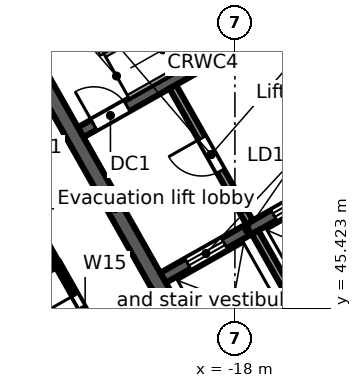
"""IFC4 building model, lengths in metres.
Left out: names, types, materials, properties, quantities, classifications, styles, units other than length and angle.
Written with IfcOpenShell. Run it as: python <this file> out.ifc"""

import sys

from ifc_helpers import new_model, si_unit, direction, frame, frame_2d, origin, place, context, subcontext, project, spatial, rectangle, extrude, element, fill, save


model = new_model("IFC4")
c1 = context("Model", 3, precision=1e-05, world=origin(), true_north=direction((0.0, 1.0)))
c2 = subcontext(c1, "Body", "Model", "MODEL_VIEW")
j1 = project(units=[si_unit("LENGTHUNIT", "METRE"), si_unit("PLANEANGLEUNIT", "RADIAN")], contexts=[c1])
p1 = place(None, origin())
s1 = spatial("IfcSite", under=j1, at=p1, CompositionType="ELEMENT")
p2 = place(p1, origin())
s2 = spatial("IfcBuilding", under=s1, at=p2, CompositionType="ELEMENT")
p3 = place(p2, frame((0.0, 0.0, 266.5)))
s3 = spatial("IfcBuildingStorey", under=s2, at=p3, CompositionType="ELEMENT", Elevation=266.5)
p4 = place(p3, frame((-58.732, 38.771, 0.0), z_axis=(0.0, 0.0, 1.0), x_axis=(0.870355615581, 0.492423702137, 0.0)))
e1 = element("IfcWall", 1, at=p4, inside=s3, PredefinedType="STANDARD", context=c2, shape_type="SweptSolid", body=[
    extrude(rectangle(XDim=64.052, YDim=0.25, at=frame_2d((32.026, 0.0))), origin(), (0.0, 0.0, 1.0), 3.52),
])
p5 = place(p4, frame((61.259, 0.0, 0.8)))
e2 = element("IfcOpeningElement", 2, at=p5, cuts=e1, PredefinedType="OPENING", context=c2, shape_type="SweptSolid", body=[
    extrude(rectangle(XDim=2.4, YDim=2.2, at=frame_2d((1.2, 1.1))), frame((0.0, 0.135, 0.0), z_axis=(0.0, -1.0, 0.0), x_axis=(1.0, 0.0, 0.0)), (0.0, 0.0, 1.0), 0.27),
])
p6 = place(p4, frame((58.216, 0.0, 0.8)))
e3 = element("IfcOpeningElement", 3, at=p6, cuts=e1, PredefinedType="OPENING", context=c2, shape_type="SweptSolid", body=[
    extrude(rectangle(XDim=2.4, YDim=2.2, at=frame_2d((1.2, 1.1))), frame((0.0, 0.135, 0.0), z_axis=(0.0, -1.0, 0.0), x_axis=(1.0, 0.0, 0.0)), (0.0, 0.0, 1.0), 0.27),
])
p7 = place(p4, frame((55.173, 0.0, 0.8)))
e4 = element("IfcOpeningElement", 4, at=p7, cuts=e1, PredefinedType="OPENING", context=c2, shape_type="SweptSolid", body=[
    extrude(rectangle(XDim=2.4, YDim=2.2, at=frame_2d((1.2, 1.1))), frame((0.0, 0.135, 0.0), z_axis=(0.0, -1.0, 0.0), x_axis=(1.0, 0.0, 0.0)), (0.0, 0.0, 1.0), 0.27),
])
p8 = place(p4, frame((52.129, 0.0, 0.8)))
e5 = element("IfcOpeningElement", 5, at=p8, cuts=e1, PredefinedType="OPENING", context=c2, shape_type="SweptSolid", body=[
    extrude(rectangle(XDim=2.4, YDim=2.2, at=frame_2d((1.2, 1.1))), frame((0.0, 0.135, 0.0), z_axis=(0.0, -1.0, 0.0), x_axis=(1.0, 0.0, 0.0)), (0.0, 0.0, 1.0), 0.27),
])
p9 = place(p4, frame((49.086, 0.0, 0.8)))
e6 = element("IfcOpeningElement", 6, at=p9, cuts=e1, PredefinedType="OPENING", context=c2, shape_type="SweptSolid", body=[
    extrude(rectangle(XDim=2.4, YDim=2.2, at=frame_2d((1.2, 1.1))), frame((0.0, 0.135, 0.0), z_axis=(0.0, -1.0, 0.0), x_axis=(1.0, 0.0, 0.0)), (0.0, 0.0, 1.0), 0.27),
])
p10 = place(p4, frame((46.043, 0.0, 0.8)))
e7 = element("IfcOpeningElement", 7, at=p10, cuts=e1, PredefinedType="OPENING", context=c2, shape_type="SweptSolid", body=[
    extrude(rectangle(XDim=2.4, YDim=2.2, at=frame_2d((1.2, 1.1))), frame((0.0, 0.135, 0.0), z_axis=(0.0, -1.0, 0.0), x_axis=(1.0, 0.0, 0.0)), (0.0, 0.0, 1.0), 0.27),
])
p11 = place(p4, frame((43.0, 0.0, 0.8)))
e8 = element("IfcOpeningElement", 8, at=p11, cuts=e1, PredefinedType="OPENING", context=c2, shape_type="SweptSolid", body=[
    extrude(rectangle(XDim=2.4, YDim=2.2, at=frame_2d((1.2, 1.1))), frame((0.0, 0.135, 0.0), z_axis=(0.0, -1.0, 0.0), x_axis=(1.0, 0.0, 0.0)), (0.0, 0.0, 1.0), 0.27),
])
p12 = place(p4, frame((39.956, 0.0, 0.8)))
e9 = element("IfcOpeningElement", 9, at=p12, cuts=e1, PredefinedType="OPENING", context=c2, shape_type="SweptSolid", body=[
    extrude(rectangle(XDim=2.4, YDim=2.2, at=frame_2d((1.2, 1.1))), frame((0.0, 0.135, 0.0), z_axis=(0.0, -1.0, 0.0), x_axis=(1.0, 0.0, 0.0)), (0.0, 0.0, 1.0), 0.27),
])
p13 = place(p4, frame((36.913, 0.0, 0.8)))
e10 = element("IfcOpeningElement", 10, at=p13, cuts=e1, PredefinedType="OPENING", context=c2, shape_type="SweptSolid", body=[
    extrude(rectangle(XDim=2.4, YDim=2.2, at=frame_2d((1.2, 1.1))), frame((0.0, 0.135, 0.0), z_axis=(0.0, -1.0, 0.0), x_axis=(1.0, 0.0, 0.0)), (0.0, 0.0, 1.0), 0.27),
])
p14 = place(p4, frame((33.87, 0.0, 0.8)))
e11 = element("IfcOpeningElement", 11, at=p14, cuts=e1, PredefinedType="OPENING", context=c2, shape_type="SweptSolid", body=[
    extrude(rectangle(XDim=2.4, YDim=2.2, at=frame_2d((1.2, 1.1))), frame((0.0, 0.135, 0.0), z_axis=(0.0, -1.0, 0.0), x_axis=(1.0, 0.0, 0.0)), (0.0, 0.0, 1.0), 0.27),
])
p15 = place(p4, frame((30.826, 0.0, 0.8)))
e12 = element("IfcOpeningElement", 12, at=p15, cuts=e1, PredefinedType="OPENING", context=c2, shape_type="SweptSolid", body=[
    extrude(rectangle(XDim=2.4, YDim=2.2, at=frame_2d((1.2, 1.1))), frame((0.0, 0.135, 0.0), z_axis=(0.0, -1.0, 0.0), x_axis=(1.0, 0.0, 0.0)), (0.0, 0.0, 1.0), 0.27),
])
p16 = place(p4, frame((27.783, 0.0, 0.8)))
e13 = element("IfcOpeningElement", 13, at=p16, cuts=e1, PredefinedType="OPENING", context=c2, shape_type="SweptSolid", body=[
    extrude(rectangle(XDim=2.4, YDim=2.2, at=frame_2d((1.2, 1.1))), frame((0.0, 0.135, 0.0), z_axis=(0.0, -1.0, 0.0), x_axis=(1.0, 0.0, 0.0)), (0.0, 0.0, 1.0), 0.27),
])
p17 = place(p4, frame((24.74, 0.0, 0.8)))
e14 = element("IfcOpeningElement", 14, at=p17, cuts=e1, PredefinedType="OPENING", context=c2, shape_type="SweptSolid", body=[
    extrude(rectangle(XDim=2.4, YDim=2.2, at=frame_2d((1.2, 1.1))), frame((0.0, 0.135, 0.0), z_axis=(0.0, -1.0, 0.0), x_axis=(1.0, 0.0, 0.0)), (0.0, 0.0, 1.0), 0.27),
])
p18 = place(p4, frame((21.696, 0.0, 0.8)))
e15 = element("IfcOpeningElement", 15, at=p18, cuts=e1, PredefinedType="OPENING", context=c2, shape_type="SweptSolid", body=[
    extrude(rectangle(XDim=2.4, YDim=2.2, at=frame_2d((1.2, 1.1))), frame((0.0, 0.135, 0.0), z_axis=(0.0, -1.0, 0.0), x_axis=(1.0, 0.0, 0.0)), (0.0, 0.0, 1.0), 0.27),
])
p19 = place(p4, frame((18.653, 0.0, 0.8)))
e16 = element("IfcOpeningElement", 16, at=p19, cuts=e1, PredefinedType="OPENING", context=c2, shape_type="SweptSolid", body=[
    extrude(rectangle(XDim=2.4, YDim=2.2, at=frame_2d((1.2, 1.1))), frame((0.0, 0.135, 0.0), z_axis=(0.0, -1.0, 0.0), x_axis=(1.0, 0.0, 0.0)), (0.0, 0.0, 1.0), 0.27),
])
p20 = place(p4, frame((15.61, 0.0, 0.8)))
e17 = element("IfcOpeningElement", 17, at=p20, cuts=e1, PredefinedType="OPENING", context=c2, shape_type="SweptSolid", body=[
    extrude(rectangle(XDim=2.4, YDim=2.2, at=frame_2d((1.2, 1.1))), frame((0.0, 0.135, 0.0), z_axis=(0.0, -1.0, 0.0), x_axis=(1.0, 0.0, 0.0)), (0.0, 0.0, 1.0), 0.27),
])
p21 = place(p4, frame((12.567, 0.0, 0.8)))
e18 = element("IfcOpeningElement", 18, at=p21, cuts=e1, PredefinedType="OPENING", context=c2, shape_type="SweptSolid", body=[
    extrude(rectangle(XDim=2.4, YDim=2.2, at=frame_2d((1.2, 1.1))), frame((0.0, 0.135, 0.0), z_axis=(0.0, -1.0, 0.0), x_axis=(1.0, 0.0, 0.0)), (0.0, 0.0, 1.0), 0.27),
])
p22 = place(p4, frame((9.523, 0.0, 0.8)))
e19 = element("IfcOpeningElement", 19, at=p22, cuts=e1, PredefinedType="OPENING", context=c2, shape_type="SweptSolid", body=[
    extrude(rectangle(XDim=2.4, YDim=2.2, at=frame_2d((1.2, 1.1))), frame((0.0, 0.135, 0.0), z_axis=(0.0, -1.0, 0.0), x_axis=(1.0, 0.0, 0.0)), (0.0, 0.0, 1.0), 0.27),
])
p23 = place(p4, frame((6.48, 0.0, 0.8)))
e20 = element("IfcOpeningElement", 20, at=p23, cuts=e1, PredefinedType="OPENING", context=c2, shape_type="SweptSolid", body=[
    extrude(rectangle(XDim=2.4, YDim=2.2, at=frame_2d((1.2, 1.1))), frame((0.0, 0.135, 0.0), z_axis=(0.0, -1.0, 0.0), x_axis=(1.0, 0.0, 0.0)), (0.0, 0.0, 1.0), 0.27),
])
p24 = place(p4, frame((3.437, 0.0, 0.8)))
e21 = element("IfcOpeningElement", 21, at=p24, cuts=e1, PredefinedType="OPENING", context=c2, shape_type="SweptSolid", body=[
    extrude(rectangle(XDim=2.4, YDim=2.2, at=frame_2d((1.2, 1.1))), frame((0.0, 0.135, 0.0), z_axis=(0.0, -1.0, 0.0), x_axis=(1.0, 0.0, 0.0)), (0.0, 0.0, 1.0), 0.27),
])
p25 = place(p4, frame((0.393, 0.0, 0.8)))
e22 = element("IfcOpeningElement", 22, at=p25, cuts=e1, PredefinedType="OPENING", context=c2, shape_type="SweptSolid", body=[
    extrude(rectangle(XDim=2.4, YDim=2.2, at=frame_2d((1.2, 1.1))), frame((0.0, 0.135, 0.0), z_axis=(0.0, -1.0, 0.0), x_axis=(1.0, 0.0, 0.0)), (0.0, 0.0, 1.0), 0.27),
])
p26 = place(p3, frame((-3.017, 46.293, 0.0), z_axis=(0.0, 0.0, 1.0), x_axis=(-0.870355474887, -0.492423950812, 0.0)))
e23 = element("IfcWall", 23, at=p26, inside=s3, PredefinedType="STANDARD", context=c2, shape_type="SweptSolid", body=[
    extrude(rectangle(XDim=40.34, YDim=0.25, at=frame_2d((20.17, 0.0))), origin(), (0.0, 0.0, 1.0), 3.52),
])
p27 = place(p26, frame((37.428, 0.0, 0.8)))
e24 = element("IfcOpeningElement", 24, at=p27, cuts=e23, PredefinedType="OPENING", context=c2, shape_type="SweptSolid", body=[
    extrude(rectangle(XDim=2.4, YDim=2.2, at=frame_2d((1.2, 1.1))), frame((0.0, 0.135, 0.0), z_axis=(0.0, -1.0, 0.0), x_axis=(1.0, 0.0, 0.0)), (0.0, 0.0, 1.0), 0.27),
])
p28 = place(p26, frame((34.372, 0.0, 0.0)))
e25 = element("IfcOpeningElement", 25, at=p28, cuts=e23, PredefinedType="OPENING", context=c2, shape_type="SweptSolid", body=[
    extrude(rectangle(XDim=1.8, YDim=2.4, at=frame_2d((0.9, 1.2))), frame((0.0, 0.135, 0.0), z_axis=(0.0, -1.0, 0.0), x_axis=(1.0, 0.0, 0.0)), (0.0, 0.0, 1.0), 0.27),
])
p29 = place(p26, frame((30.716, 0.0, 0.8)))
e26 = element("IfcOpeningElement", 26, at=p29, cuts=e23, PredefinedType="OPENING", context=c2, shape_type="SweptSolid", body=[
    extrude(rectangle(XDim=2.4, YDim=2.2, at=frame_2d((1.2, 1.1))), frame((0.0, 0.135, 0.0), z_axis=(0.0, -1.0, 0.0), x_axis=(1.0, 0.0, 0.0)), (0.0, 0.0, 1.0), 0.27),
])
p30 = place(p26, frame((27.36, 0.0, 0.8)))
e27 = element("IfcOpeningElement", 27, at=p30, cuts=e23, PredefinedType="OPENING", context=c2, shape_type="SweptSolid", body=[
    extrude(rectangle(XDim=2.4, YDim=2.2, at=frame_2d((1.2, 1.1))), frame((0.0, 0.135, 0.0), z_axis=(0.0, -1.0, 0.0), x_axis=(1.0, 0.0, 0.0)), (0.0, 0.0, 1.0), 0.27),
])
p31 = place(p26, frame((24.304, 0.0, 0.0)))
e28 = element("IfcOpeningElement", 28, at=p31, cuts=e23, PredefinedType="OPENING", context=c2, shape_type="SweptSolid", body=[
    extrude(rectangle(XDim=1.8, YDim=2.4, at=frame_2d((0.9, 1.2))), frame((0.0, 0.135, 0.0), z_axis=(0.0, -1.0, 0.0), x_axis=(1.0, 0.0, 0.0)), (0.0, 0.0, 1.0), 0.27),
])
p32 = place(p26, frame((20.648, 0.0, 0.8)))
e29 = element("IfcOpeningElement", 29, at=p32, cuts=e23, PredefinedType="OPENING", context=c2, shape_type="SweptSolid", body=[
    extrude(rectangle(XDim=2.4, YDim=2.2, at=frame_2d((1.2, 1.1))), frame((0.0, 0.135, 0.0), z_axis=(0.0, -1.0, 0.0), x_axis=(1.0, 0.0, 0.0)), (0.0, 0.0, 1.0), 0.27),
])
p33 = place(p26, frame((17.292, 0.0, 0.8)))
e30 = element("IfcOpeningElement", 30, at=p33, cuts=e23, PredefinedType="OPENING", context=c2, shape_type="SweptSolid", body=[
    extrude(rectangle(XDim=2.4, YDim=2.2, at=frame_2d((1.2, 1.1))), frame((0.0, 0.135, 0.0), z_axis=(0.0, -1.0, 0.0), x_axis=(1.0, 0.0, 0.0)), (0.0, 0.0, 1.0), 0.27),
])
p34 = place(p26, frame((14.236, 0.0, 0.0)))
e31 = element("IfcOpeningElement", 31, at=p34, cuts=e23, PredefinedType="OPENING", context=c2, shape_type="SweptSolid", body=[
    extrude(rectangle(XDim=1.8, YDim=2.4, at=frame_2d((0.9, 1.2))), frame((0.0, 0.135, 0.0), z_axis=(0.0, -1.0, 0.0), x_axis=(1.0, 0.0, 0.0)), (0.0, 0.0, 1.0), 0.27),
])
p35 = place(p26, frame((10.58, 0.0, 0.8)))
e32 = element("IfcOpeningElement", 32, at=p35, cuts=e23, PredefinedType="OPENING", context=c2, shape_type="SweptSolid", body=[
    extrude(rectangle(XDim=2.4, YDim=2.2, at=frame_2d((1.2, 1.1))), frame((0.0, 0.135, 0.0), z_axis=(0.0, -1.0, 0.0), x_axis=(1.0, 0.0, 0.0)), (0.0, 0.0, 1.0), 0.27),
])
p36 = place(p26, frame((7.224, 0.0, 0.8)))
e33 = element("IfcOpeningElement", 33, at=p36, cuts=e23, PredefinedType="OPENING", context=c2, shape_type="SweptSolid", body=[
    extrude(rectangle(XDim=2.4, YDim=2.2, at=frame_2d((1.2, 1.1))), frame((0.0, 0.135, 0.0), z_axis=(0.0, -1.0, 0.0), x_axis=(1.0, 0.0, 0.0)), (0.0, 0.0, 1.0), 0.27),
])
p37 = place(p26, frame((4.168, 0.0, 0.0)))
e34 = element("IfcOpeningElement", 34, at=p37, cuts=e23, PredefinedType="OPENING", context=c2, shape_type="SweptSolid", body=[
    extrude(rectangle(XDim=1.8, YDim=2.4, at=frame_2d((0.9, 1.2))), frame((0.0, 0.135, 0.0), z_axis=(0.0, -1.0, 0.0), x_axis=(1.0, 0.0, 0.0)), (0.0, 0.0, 1.0), 0.27),
])
p38 = place(p26, frame((0.512, 0.0, 0.8)))
e35 = element("IfcOpeningElement", 35, at=p38, cuts=e23, PredefinedType="OPENING", context=c2, shape_type="SweptSolid", body=[
    extrude(rectangle(XDim=2.4, YDim=2.2, at=frame_2d((1.2, 1.1))), frame((0.0, 0.135, 0.0), z_axis=(0.0, -1.0, 0.0), x_axis=(1.0, 0.0, 0.0)), (0.0, 0.0, 1.0), 0.27),
])
p39 = place(p3, frame((-17.975, 42.017, 0.0), z_axis=(0.0, 0.0, 1.0), x_axis=(0.87034965173, 0.492434243055, 0.0)))
e36 = element("IfcWall", 36, at=p39, inside=s3, PredefinedType="SOLIDWALL", context=c2, shape_type="SweptSolid", body=[
    extrude(rectangle(XDim=15.0, YDim=0.4, at=frame_2d((7.5, 0.0))), origin(), (0.0, 0.0, 1.0), 3.52),
])
p40 = place(p39, frame((6.1, 0.0, 0.0)))
e37 = element("IfcOpeningElement", 37, at=p40, cuts=e36, PredefinedType="OPENING", context=c2, shape_type="SweptSolid", body=[
    extrude(rectangle(XDim=1.2, YDim=2.1, at=frame_2d((0.6, 1.05))), frame((0.0, 0.21, 0.0), z_axis=(0.0, -1.0, 0.0), x_axis=(1.0, 0.0, 0.0)), (0.0, 0.0, 1.0), 0.42),
])
p41 = place(p3, frame((-19.892, 46.218, 0.0), z_axis=(0.0, 0.0, 1.0), x_axis=(0.870341639186, 0.492448404505, 0.0)))
e38 = element("IfcWall", 38, at=p41, inside=s3, PredefinedType="SOLIDWALL", context=c2, shape_type="SweptSolid", body=[
    extrude(rectangle(XDim=5.1, YDim=0.3, at=frame_2d((2.55, 0.0))), origin(), (0.0, 0.0, 1.0), 3.52),
])
p42 = place(p41, frame((0.75, 0.0, 0.0)))
e39 = element("IfcOpeningElement", 39, at=p42, cuts=e38, PredefinedType="OPENING", context=c2, shape_type="SweptSolid", body=[
    extrude(rectangle(XDim=1.1, YDim=2.1, at=frame_2d((0.55, 1.05))), frame((0.0, 0.16, 0.0), z_axis=(0.0, -1.0, 0.0), x_axis=(1.0, 0.0, 0.0)), (0.0, 0.0, 1.0), 0.32),
])
p43 = place(p41, frame((3.35, 0.0, 0.0)))
e40 = element("IfcOpeningElement", 40, at=p43, cuts=e38, PredefinedType="OPENING", context=c2, shape_type="SweptSolid", body=[
    extrude(rectangle(XDim=1.1, YDim=2.1, at=frame_2d((0.55, 1.05))), frame((0.0, 0.16, 0.0), z_axis=(0.0, -1.0, 0.0), x_axis=(1.0, 0.0, 0.0)), (0.0, 0.0, 1.0), 0.32),
])
p44 = place(p3, frame((-22.059, 50.047, 0.0), z_axis=(0.0, 0.0, 1.0), x_axis=(0.87035077051, 0.49243226567, 0.0)))
e41 = element("IfcWall", 41, at=p44, inside=s3, PredefinedType="SOLIDWALL", context=c2, shape_type="SweptSolid", body=[
    extrude(rectangle(XDim=7.4, YDim=0.3, at=frame_2d((3.7, 0.0))), origin(), (0.0, 0.0, 1.0), 3.52),
])
p45 = place(p44, frame((0.4, 0.0, 0.0)))
e42 = element("IfcOpeningElement", 42, at=p45, cuts=e41, PredefinedType="OPENING", context=c2, shape_type="SweptSolid", body=[
    extrude(rectangle(XDim=1.0, YDim=2.1, at=frame_2d((0.5, 1.05))), frame((0.0, 0.16, 0.0), z_axis=(0.0, -1.0, 0.0), x_axis=(1.0, 0.0, 0.0)), (0.0, 0.0, 1.0), 0.32),
])
p46 = place(p3, frame((-24.4, 53.779, 0.0), z_axis=(0.0, 0.0, 1.0), x_axis=(0.492421663121, -0.870356769198, 0.0)))
e43 = element("IfcWall", 43, at=p46, inside=s3, PredefinedType="SOLIDWALL", context=c2, shape_type="SweptSolid", body=[
    extrude(rectangle(XDim=13.2, YDim=0.4, at=frame_2d((6.6, 0.0))), origin(), (0.0, 0.0, 1.0), 3.52),
])
p47 = place(p3, frame((-17.469, 47.417, 0.0), z_axis=(0.0, 0.0, 1.0), x_axis=(0.492466057713, -0.870331650579, 0.0)))
e44 = element("IfcWall", 44, at=p47, inside=s3, PredefinedType="SOLIDWALL", context=c2, shape_type="SweptSolid", body=[
    extrude(rectangle(XDim=4.25, YDim=0.2, at=frame_2d((2.125, 0.0))), origin(), (0.0, 0.0, 1.0), 3.52),
])
p48 = place(p3, frame((-19.635, 51.246, 0.0), z_axis=(0.0, 0.0, 1.0), x_axis=(0.492408451753, -0.87036424366, 0.0)))
e45 = element("IfcWall", 45, at=p48, inside=s3, PredefinedType="PARTITIONING", context=c2, shape_type="SweptSolid", body=[
    extrude(rectangle(XDim=4.1, YDim=0.2, at=frame_2d((2.05, 0.0))), origin(), (0.0, 0.0, 1.0), 3.52),
])
p49 = place(p48, frame((1.55, 0.0, 0.0)))
e46 = element("IfcOpeningElement", 46, at=p49, cuts=e45, PredefinedType="OPENING", context=c2, shape_type="SweptSolid", body=[
    extrude(rectangle(XDim=1.0, YDim=2.1, at=frame_2d((0.5, 1.05))), frame((0.0, 0.11, 0.0), z_axis=(0.0, -1.0, 0.0), x_axis=(1.0, 0.0, 0.0)), (0.0, 0.0, 1.0), 0.22),
])
p50 = place(p3, frame((-28.119, 43.516, 0.0), z_axis=(0.0, 0.0, 1.0), x_axis=(0.870310250913, 0.49250387527, 0.0)))
e47 = element("IfcWall", 47, at=p50, inside=s3, PredefinedType="PARTITIONING", context=c2, shape_type="SweptSolid", body=[
    extrude(rectangle(XDim=6.25, YDim=0.15, at=frame_2d((3.125, 0.0))), origin(), (0.0, 0.0, 1.0), 2.792),
])
p51 = place(p3, frame((-24.649, 50.075, 0.0), z_axis=(0.0, 0.0, 1.0), x_axis=(0.492340861121, -0.870402479587, 0.0)))
e48 = element("IfcWall", 48, at=p51, inside=s3, PredefinedType="PARTITIONING", context=c2, shape_type="SweptSolid", body=[
    extrude(rectangle(XDim=3.999, YDim=0.125, at=frame_2d((2.0, 0.0))), origin(), (0.0, 0.0, 1.0), 2.792),
])
p52 = place(p51, frame((1.45, 0.0, 0.0)))
e49 = element("IfcOpeningElement", 49, at=p52, cuts=e48, PredefinedType="OPENING", context=c2, shape_type="SweptSolid", body=[
    extrude(rectangle(XDim=0.9, YDim=2.1, at=frame_2d((0.45, 1.05))), frame((0.0, 0.073, 0.0), z_axis=(0.0, -1.0, 0.0), x_axis=(1.0, 0.0, 0.0)), (0.0, 0.0, 1.0), 0.145),
])
p53 = place(p3, frame((-22.68, 46.594, 0.0), z_axis=(0.0, 0.0, 1.0), x_axis=(0.492612172641, -0.870248957119, 0.0)))
e50 = element("IfcWall", 50, at=p53, inside=s3, PredefinedType="PARTITIONING", context=c2, shape_type="SweptSolid", body=[
    extrude(rectangle(XDim=3.0, YDim=0.15, at=frame_2d((1.5, 0.0))), origin(), (0.0, 0.0, 1.0), 3.52),
])
p54 = place(p53, frame((0.95, 0.0, 0.0)))
e51 = element("IfcOpeningElement", 51, at=p54, cuts=e50, PredefinedType="OPENING", context=c2, shape_type="SweptSolid", body=[
    extrude(rectangle(XDim=0.9, YDim=2.1, at=frame_2d((0.45, 1.05))), frame((0.0, 0.085, 0.0), z_axis=(0.0, -1.0, 0.0), x_axis=(1.0, 0.0, 0.0)), (0.0, 0.0, 1.0), 0.17),
])
p55 = place(p42, origin())
e52 = element("IfcDoor", 52, at=p55, inside=s3, OperationType="DOUBLE_DOOR_SLIDING", PredefinedType="DOOR", context=c2, shape_type="SweptSolid", body=[
    extrude(rectangle(XDim=1.1, YDim=2.1, at=frame_2d((0.55, 1.05))), frame((0.0, 0.025, 0.0), z_axis=(0.0, -1.0, 0.0), x_axis=(1.0, 0.0, 0.0)), (0.0, 0.0, 1.0), 0.05),
])
fill(e39, e52)
p56 = place(p43, origin())
e53 = element("IfcDoor", 53, at=p56, inside=s3, OperationType="DOUBLE_DOOR_SLIDING", PredefinedType="DOOR", context=c2, shape_type="SweptSolid", body=[
    extrude(rectangle(XDim=1.1, YDim=2.1, at=frame_2d((0.55, 1.05))), frame((0.0, 0.025, 0.0), z_axis=(0.0, -1.0, 0.0), x_axis=(1.0, 0.0, 0.0)), (0.0, 0.0, 1.0), 0.05),
])
fill(e40, e53)
p57 = place(p45, origin())
e54 = element("IfcDoor", 54, at=p57, inside=s3, OperationType="SINGLE_SWING_LEFT", PredefinedType="DOOR", context=c2, shape_type="SweptSolid", body=[
    extrude(rectangle(XDim=1.0, YDim=2.1, at=frame_2d((0.5, 1.05))), frame((0.0, 0.025, 0.0), z_axis=(0.0, -1.0, 0.0), x_axis=(1.0, 0.0, 0.0)), (0.0, 0.0, 1.0), 0.05),
])
fill(e42, e54)
p58 = place(p49, frame((1.0, 0.0, 0.0), z_axis=(0.0, 0.0, 1.0), x_axis=(-1.0, 0.0, 0.0)))
e55 = element("IfcDoor", 55, at=p58, inside=s3, OperationType="SINGLE_SWING_RIGHT", PredefinedType="DOOR", context=c2, shape_type="SweptSolid", body=[
    extrude(rectangle(XDim=1.0, YDim=2.1, at=frame_2d((0.5, 1.05))), frame((0.0, 0.025, 0.0), z_axis=(0.0, -1.0, 0.0), x_axis=(1.0, 0.0, 0.0)), (0.0, 0.0, 1.0), 0.05),
])
fill(e46, e55)
p59 = place(p54, frame((0.9, 0.0, 0.0), z_axis=(0.0, 0.0, 1.0), x_axis=(-1.0, 0.0, 0.0)))
e56 = element("IfcDoor", 56, at=p59, inside=s3, OperationType="SINGLE_SWING_RIGHT", PredefinedType="DOOR", context=c2, shape_type="SweptSolid", body=[
    extrude(rectangle(XDim=0.9, YDim=2.1, at=frame_2d((0.45, 1.05))), frame((0.0, 0.025, 0.0), z_axis=(0.0, -1.0, 0.0), x_axis=(1.0, 0.0, 0.0)), (0.0, 0.0, 1.0), 0.05),
])
fill(e51, e56)
save(model, sys.argv[1])
